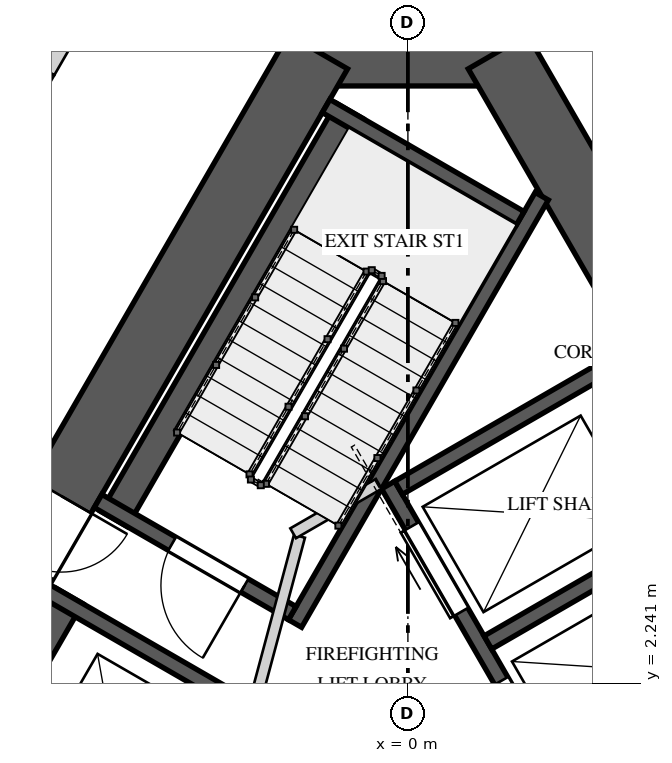
"""IFC4 building model, lengths in metres.
Left out: names, types, materials, properties, quantities, classifications, styles, units other than length and angle.
Written with IfcOpenShell. Run it as: python <this file> out.ifc"""

import sys

from ifc_helpers import new_model, si_unit, direction, frame, frame_2d, origin, place, context, subcontext, project, spatial, rectangle, extrude, element, fill, save


model = new_model("IFC4")
c1 = context("Model", 3, precision=1e-05, world=origin(), true_north=direction((0.0, 1.0)))
c2 = subcontext(c1, "Body", "Model", "MODEL_VIEW")
j1 = project(units=[si_unit("LENGTHUNIT", "METRE"), si_unit("PLANEANGLEUNIT", "RADIAN")], contexts=[c1])
p1 = place(None, origin())
s1 = spatial("IfcSite", under=j1, at=p1, CompositionType="ELEMENT")
p2 = place(p1, origin())
s2 = spatial("IfcBuilding", under=s1, at=p2, CompositionType="ELEMENT")
p3 = place(p2, frame((0.0, 0.0, 125.6)))
s3 = spatial("IfcBuildingStorey", under=s2, at=p3, CompositionType="ELEMENT", Elevation=125.6)
p4 = place(p3, frame((1.443, 10.55, 0.0), z_axis=(0.0, 0.0, 1.0), x_axis=(-1.0, 0.0, 0.0)))
e1 = element("IfcWall", 1, at=p4, inside=s3, PredefinedType="SHEAR", context=c2, shape_type="SweptSolid", body=[
    extrude(rectangle(XDim=2.887, YDim=0.9, at=frame_2d((1.443, 0.0))), origin(), (0.0, 0.0, 1.0), 4.0),
])
p5 = place(p3, frame((-1.184, 10.55, 0.0), z_axis=(0.0, 0.0, 1.0), x_axis=(-0.500004814304, -0.866022624227, 0.0)))
e2 = element("IfcWall", 2, at=p5, inside=s3, PredefinedType="SHEAR", context=c2, shape_type="SweptSolid", body=[
    extrude(rectangle(XDim=17.09, YDim=0.9, at=frame_2d((8.545, 0.0))), origin(), (0.0, 0.0, 1.0), 4.0),
])
p6 = place(p5, frame((6.75, 0.0, 0.0)))
e3 = element("IfcOpeningElement", 3, at=p6, cuts=e2, PredefinedType="OPENING", context=c2, shape_type="SweptSolid", body=[
    extrude(rectangle(XDim=1.0, YDim=2.4, at=frame_2d((0.5, 1.2))), frame((0.0, 0.46, 0.0), z_axis=(0.0, -1.0, 0.0), x_axis=(1.0, 0.0, 0.0)), (0.0, 0.0, 1.0), 0.92),
])
p7 = place(p5, frame((14.678, 0.0, 0.0)))
e4 = element("IfcOpeningElement", 4, at=p7, cuts=e2, PredefinedType="OPENING", context=c2, shape_type="SweptSolid", body=[
    extrude(rectangle(XDim=0.8, YDim=2.1, at=frame_2d((0.4, 1.05))), frame((0.0, 0.46, 0.0), z_axis=(0.0, -1.0, 0.0), x_axis=(1.0, 0.0, 0.0)), (0.0, 0.0, 1.0), 0.92),
])
p8 = place(p3, frame((9.729, -4.25, 0.0), z_axis=(0.0, 0.0, 1.0), x_axis=(-0.500004814304, 0.866022624227, 0.0)))
e5 = element("IfcWall", 5, at=p8, inside=s3, PredefinedType="SHEAR", context=c2, shape_type="SweptSolid", body=[
    extrude(rectangle(XDim=17.09, YDim=0.9, at=frame_2d((8.545, 0.0))), origin(), (0.0, 0.0, 1.0), 4.0),
])
p9 = place(p8, frame((6.82, 0.0, 0.0)))
e6 = element("IfcOpeningElement", 6, at=p9, cuts=e5, PredefinedType="OPENING", context=c2, shape_type="SweptSolid", body=[
    extrude(rectangle(XDim=1.0, YDim=2.4, at=frame_2d((0.5, 1.2))), frame((0.0, 0.46, 0.0), z_axis=(0.0, -1.0, 0.0), x_axis=(1.0, 0.0, 0.0)), (0.0, 0.0, 1.0), 0.92),
])
p10 = place(p3, frame((-0.766, 9.772, 0.0), z_axis=(0.0, 0.0, 1.0), x_axis=(-0.500009909098, -0.866019682689, 0.0)))
e7 = element("IfcWall", 7, at=p10, inside=s3, PredefinedType="SOLIDWALL", context=c2, shape_type="SweptSolid", body=[
    extrude(rectangle(XDim=6.2, YDim=0.4, at=frame_2d((3.1, 0.0))), origin(), (0.0, 0.0, 1.0), 3.65),
])
p11 = place(p3, frame((1.761, 8.65, 0.0), z_axis=(0.0, 0.0, 1.0), x_axis=(-0.500010023241, -0.866019616786, 0.0)))
e8 = element("IfcWall", 8, at=p11, inside=s3, PredefinedType="SOLIDWALL", context=c2, shape_type="SweptSolid", body=[
    extrude(rectangle(XDim=6.491, YDim=0.2, at=frame_2d((3.246, 0.0))), origin(), (0.0, 0.0, 1.0), 3.65),
])
p12 = place(p3, frame((1.479, 8.361, 0.0), z_axis=(0.0, 0.0, 1.0), x_axis=(-0.866003658127, 0.500037662692, 0.0)))
e9 = element("IfcWall", 9, at=p12, inside=s3, PredefinedType="SOLIDWALL", context=c2, shape_type="SweptSolid", body=[
    extrude(rectangle(XDim=2.95, YDim=0.2, at=frame_2d((1.475, 0.0))), origin(), (0.0, 0.0, 1.0), 3.65),
])
p13 = place(p3, frame((-1.521, 3.165, 0.0), z_axis=(0.0, 0.0, 1.0), x_axis=(-0.866039495442, 0.49997559174, 0.0)))
e10 = element("IfcWall", 10, at=p13, inside=s3, PredefinedType="SOLIDWALL", context=c2, shape_type="SweptSolid", body=[
    extrude(rectangle(XDim=2.95, YDim=0.2, at=frame_2d((1.475, 0.0))), origin(), (0.0, 0.0, 1.0), 3.65),
])
p14 = place(p13, frame((0.725, 0.0, 0.0)))
e11 = element("IfcOpeningElement", 11, at=p14, cuts=e10, PredefinedType="OPENING", context=c2, shape_type="SweptSolid", body=[
    extrude(rectangle(XDim=1.1, YDim=2.4, at=frame_2d((0.55, 1.2))), frame((0.0, 0.11, 0.0), z_axis=(0.0, -1.0, 0.0), x_axis=(1.0, 0.0, 0.0)), (0.0, 0.0, 1.0), 0.22),
])
p15 = place(p3, frame((-4.451, 3.39, 0.0), z_axis=(0.0, 0.0, 1.0), x_axis=(-0.499996545922, -0.866027397988, 0.0)))
e12 = element("IfcWall", 12, at=p15, inside=s3, PredefinedType="SOLIDWALL", context=c2, shape_type="SweptSolid", body=[
    extrude(rectangle(XDim=5.5, YDim=0.4, at=frame_2d((2.75, 0.0))), origin(), (0.0, 0.0, 1.0), 3.65),
])
p16 = place(p3, frame((-2.38, 2.078, 0.0), z_axis=(0.0, 0.0, 1.0), x_axis=(-0.866027397988, 0.499996545922, 0.0)))
e13 = element("IfcWall", 13, at=p16, inside=s3, PredefinedType="SOLIDWALL", context=c2, shape_type="SweptSolid", body=[
    extrude(rectangle(XDim=2.75, YDim=0.2, at=frame_2d((1.375, 0.0))), origin(), (0.0, 0.0, 1.0), 3.65),
])
p17 = place(p3, frame((2.19, 0.606, 0.0), z_axis=(0.0, 0.0, 1.0), x_axis=(-0.500002801628, 0.866023786258, 0.0)))
e14 = element("IfcWall", 14, at=p17, inside=s3, PredefinedType="SOLIDWALL", context=c2, shape_type="SweptSolid", body=[
    extrude(rectangle(XDim=4.9, YDim=0.2, at=frame_2d((2.45, 0.0))), origin(), (0.0, 0.0, 1.0), 3.65),
])
p18 = place(p17, frame((0.625, 0.0, 0.0)))
e15 = element("IfcOpeningElement", 15, at=p18, cuts=e14, PredefinedType="OPENING", context=c2, shape_type="SweptSolid", body=[
    extrude(rectangle(XDim=1.3, YDim=2.1, at=frame_2d((0.65, 1.05))), frame((0.0, 0.11, 0.0), z_axis=(0.0, -1.0, 0.0), x_axis=(1.0, 0.0, 0.0)), (0.0, 0.0, 1.0), 0.22),
])
p19 = place(p17, frame((2.975, 0.0, 0.0)))
e16 = element("IfcOpeningElement", 16, at=p19, cuts=e14, PredefinedType="OPENING", context=c2, shape_type="SweptSolid", body=[
    extrude(rectangle(XDim=1.3, YDim=2.1, at=frame_2d((0.65, 1.05))), frame((0.0, 0.11, 0.0), z_axis=(0.0, -1.0, 0.0), x_axis=(1.0, 0.0, 0.0)), (0.0, 0.0, 1.0), 0.22),
])
for number, where, z_axis, x_axis in (
    (17, (2.227, 0.743, 0.0), (0.0, 0.0, 1.0), (0.866, 0.5, 0.0)),
    (18, (1.052, 2.778, 0.0), (0.0, 0.0, 1.0), (0.866, 0.5, 0.0)),
):
    element("IfcWall", number, at=place(p3, frame(where, z_axis=z_axis, x_axis=x_axis)), inside=s3, PredefinedType="SOLIDWALL", context=c2, shape_type="SweptSolid", body=[
        extrude(rectangle(XDim=3.55, YDim=0.2, at=frame_2d((1.775, 0.0))), origin(), (0.0, 0.0, 1.0), 3.65),
    ])
p20 = place(p3, frame((-0.123, 4.813, 0.0), z_axis=(0.0, 0.0, 1.0), x_axis=(0.865995461329, 0.500051858269, 0.0)))
e19 = element("IfcWall", 19, at=p20, inside=s3, PredefinedType="SOLIDWALL", context=c2, shape_type="SweptSolid", body=[
    extrude(rectangle(XDim=3.55, YDim=0.2, at=frame_2d((1.775, 0.0))), origin(), (0.0, 0.0, 1.0), 3.65),
])
p21 = place(p3, frame((-2.178, 1.372, 0.0), z_axis=(0.0, 0.0, 1.0), x_axis=(0.258808958833, 0.96592852884, 0.0)))
e20 = element("IfcWall", 20, at=p21, inside=s3, PredefinedType="PARTITIONING", context=c2, shape_type="SweptSolid", body=[
    extrude(rectangle(XDim=2.903, YDim=0.15, at=frame_2d((1.451, 0.0))), origin(), (0.0, 0.0, 1.0), 3.65),
])
p22 = place(p3, frame((-1.51, 4.215, 0.0), z_axis=(0.0, 0.0, 1.0), x_axis=(0.866085525409, 0.49989585183, 0.0)))
e21 = element("IfcWall", 21, at=p22, inside=s3, PredefinedType="PARTITIONING", context=c2, shape_type="SweptSolid", body=[
    extrude(rectangle(XDim=1.3, YDim=0.15, at=frame_2d((0.65, 0.0))), origin(), (0.0, 0.0, 1.0), 3.65),
])
p23 = place(p3, frame((-5.25, 9.407, 0.0), z_axis=(0.0, 0.0, 1.0), x_axis=(0.499991148707, 0.866030514021, 0.0)))
e22 = element("IfcWall", 22, at=p23, inside=s3, PredefinedType="SOLIDWALL", context=c2, shape_type="SweptSolid", body=[
    extrude(rectangle(XDim=1.022, YDim=0.2, at=frame_2d((0.511, 0.0))), origin(), (0.0, 0.0, 1.0), 3.65),
])
p24 = place(p3, frame((-4.738, 10.293, 0.0), z_axis=(0.0, 0.0, 1.0), x_axis=(0.500001688065, 0.866024429177, 0.0)))
e23 = element("IfcWall", 23, at=p24, inside=s3, PredefinedType="SOLIDWALL", context=c2, shape_type="SweptSolid", body=[
    extrude(rectangle(XDim=1.135, YDim=0.2, at=frame_2d((0.568, 0.0))), origin(), (0.0, 0.0, 1.0), 2.55),
])
p25 = place(p14, origin())
e24 = element("IfcDoor", 24, at=p25, inside=s3, OperationType="SINGLE_SWING_RIGHT", PredefinedType="DOOR", context=c2, shape_type="SweptSolid", body=[
    extrude(rectangle(XDim=1.1, YDim=2.4, at=frame_2d((0.55, 1.2))), frame((0.0, 0.025, 0.0), z_axis=(0.0, -1.0, 0.0), x_axis=(1.0, 0.0, 0.0)), (0.0, 0.0, 1.0), 0.05),
])
fill(e11, e24)
p26 = place(p18, origin())
e25 = element("IfcDoor", 25, at=p26, inside=s3, OperationType="SLIDING_TO_LEFT", PredefinedType="DOOR", context=c2, shape_type="SweptSolid", body=[
    extrude(rectangle(XDim=1.3, YDim=2.1, at=frame_2d((0.65, 1.05))), frame((0.0, 0.025, 0.0), z_axis=(0.0, -1.0, 0.0), x_axis=(1.0, 0.0, 0.0)), (0.0, 0.0, 1.0), 0.05),
])
fill(e15, e25)
p27 = place(p19, origin())
e26 = element("IfcDoor", 26, at=p27, inside=s3, OperationType="SLIDING_TO_RIGHT", PredefinedType="DOOR", context=c2, shape_type="SweptSolid", body=[
    extrude(rectangle(XDim=1.3, YDim=2.1, at=frame_2d((0.65, 1.05))), frame((0.0, 0.025, 0.0), z_axis=(0.0, -1.0, 0.0), x_axis=(1.0, 0.0, 0.0)), (0.0, 0.0, 1.0), 0.05),
])
fill(e16, e26)
p28 = place(p6, origin())
e27 = element("IfcDoor", 27, at=p28, inside=s3, OperationType="SINGLE_SWING_RIGHT", PredefinedType="DOOR", context=c2, shape_type="SweptSolid", body=[
    extrude(rectangle(XDim=1.0, YDim=2.4, at=frame_2d((0.5, 1.2))), frame((0.0, 0.025, 0.0), z_axis=(0.0, -1.0, 0.0), x_axis=(1.0, 0.0, 0.0)), (0.0, 0.0, 1.0), 0.05),
])
fill(e3, e27)
save(model, sys.argv[1])
